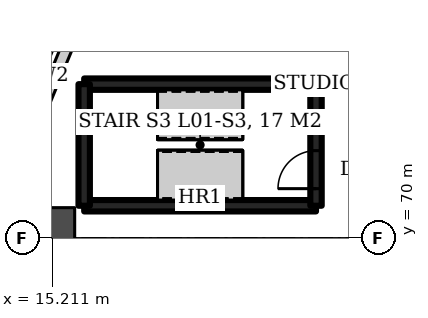
"""IFC4 building model, lengths in metres.
Left out: names, types, materials, properties, quantities, classifications, styles, units other than length and angle.
Written with IfcOpenShell. Run it as: python <this file> out.ifc"""

import sys

from ifc_helpers import new_model, si_unit, direction, frame, frame_2d, origin, origin_2d, place, context, subcontext, project, spatial, rectangle, extrude, element, fill, save


model = new_model("IFC4")
c1 = context("Model", 3, precision=1e-05, world=origin(), true_north=direction((0.0, 1.0)))
c2 = subcontext(c1, "Body", "Model", "MODEL_VIEW")
j1 = project(units=[si_unit("LENGTHUNIT", "METRE"), si_unit("PLANEANGLEUNIT", "RADIAN")], contexts=[c1])
p1 = place(None, origin())
s1 = spatial("IfcSite", under=j1, at=p1, CompositionType="ELEMENT")
p2 = place(p1, origin())
s2 = spatial("IfcBuilding", under=s1, at=p2, CompositionType="ELEMENT")
p3 = place(p2, frame((0.0, 0.0, 6.0)))
s3 = spatial("IfcBuildingStorey", under=s2, at=p3, CompositionType="ELEMENT", Elevation=6.0)
p4 = place(p3, frame((15.0, 70.0, 0.0), z_axis=(0.0, 0.0, 1.0), x_axis=(1.0, 0.0, 0.0)))
e1 = element("IfcColumn", 1, at=p4, inside=s3, PredefinedType="COLUMN", context=c2, shape_type="SweptSolid", body=[
    extrude(rectangle(XDim=1.6, YDim=1.6, at=origin_2d()), origin(), (0.0, 0.0, 1.0), 9.0),
])
p5 = place(p3, frame((15.734, 75.35, 0.0), z_axis=(0.0, 0.0, 1.0), x_axis=(-0.382709424419, -0.923868765822, 0.0)))
e2 = element("IfcWall", 2, at=p5, inside=s3, PredefinedType="SOLIDWALL", context=c2, shape_type="SweptSolid", body=[
    extrude(rectangle(XDim=2.793, YDim=0.3, at=frame_2d((1.397, 0.0))), origin(), (0.0, 0.0, 1.0), 8.7),
])
for number, where, z_axis, x_axis in (
    (3, (16.05, 70.85, 0.0), (0.0, 0.0, 1.0), (1.0, 0.0, 0.0)),
    (4, (16.05, 74.05, 0.0), (0.0, 0.0, 1.0), (1.0, 0.0, 0.0)),
):
    element("IfcWall", number, at=place(p3, frame(where, z_axis=z_axis, x_axis=x_axis)), inside=s3, PredefinedType="SHEAR", context=c2, shape_type="SweptSolid", body=[
        extrude(rectangle(XDim=6.1, YDim=0.3, at=frame_2d((3.05, 0.0))), origin(), (0.0, 0.0, 1.0), 9.0),
    ])
p6 = place(p3, frame((16.05, 70.85, 0.0), z_axis=(0.0, 0.0, 1.0), x_axis=(0.0, 1.0, 0.0)))
e5 = element("IfcWall", 5, at=p6, inside=s3, PredefinedType="SHEAR", context=c2, shape_type="SweptSolid", body=[
    extrude(rectangle(XDim=3.2, YDim=0.3, at=frame_2d((1.6, 0.0))), origin(), (0.0, 0.0, 1.0), 9.0),
])
p7 = place(p3, frame((22.15, 70.85, 0.0), z_axis=(0.0, 0.0, 1.0), x_axis=(0.0, 1.0, 0.0)))
e6 = element("IfcWall", 6, at=p7, inside=s3, PredefinedType="SHEAR", context=c2, shape_type="SweptSolid", body=[
    extrude(rectangle(XDim=3.2, YDim=0.3, at=frame_2d((1.6, 0.0))), origin(), (0.0, 0.0, 1.0), 9.0),
])
p8 = place(p7, frame((0.45, 0.0, 0.0)))
e7 = element("IfcOpeningElement", 7, at=p8, cuts=e6, PredefinedType="OPENING", context=c2, shape_type="SweptSolid", body=[
    extrude(rectangle(XDim=1.0, YDim=2.1, at=frame_2d((0.5, 1.05))), frame((0.0, 0.16, 0.0), z_axis=(0.0, -1.0, 0.0), x_axis=(1.0, 0.0, 0.0)), (0.0, 0.0, 1.0), 0.32),
])
p9 = place(p8, origin())
e8 = element("IfcDoor", 8, at=p9, inside=s3, OperationType="SINGLE_SWING_LEFT", PredefinedType="DOOR", context=c2, shape_type="SweptSolid", body=[
    extrude(rectangle(XDim=1.0, YDim=2.1, at=frame_2d((0.5, 1.05))), frame((0.0, 0.025, 0.0), z_axis=(0.0, -1.0, 0.0), x_axis=(1.0, 0.0, 0.0)), (0.0, 0.0, 1.0), 0.05),
])
fill(e7, e8)
save(model, sys.argv[1])
